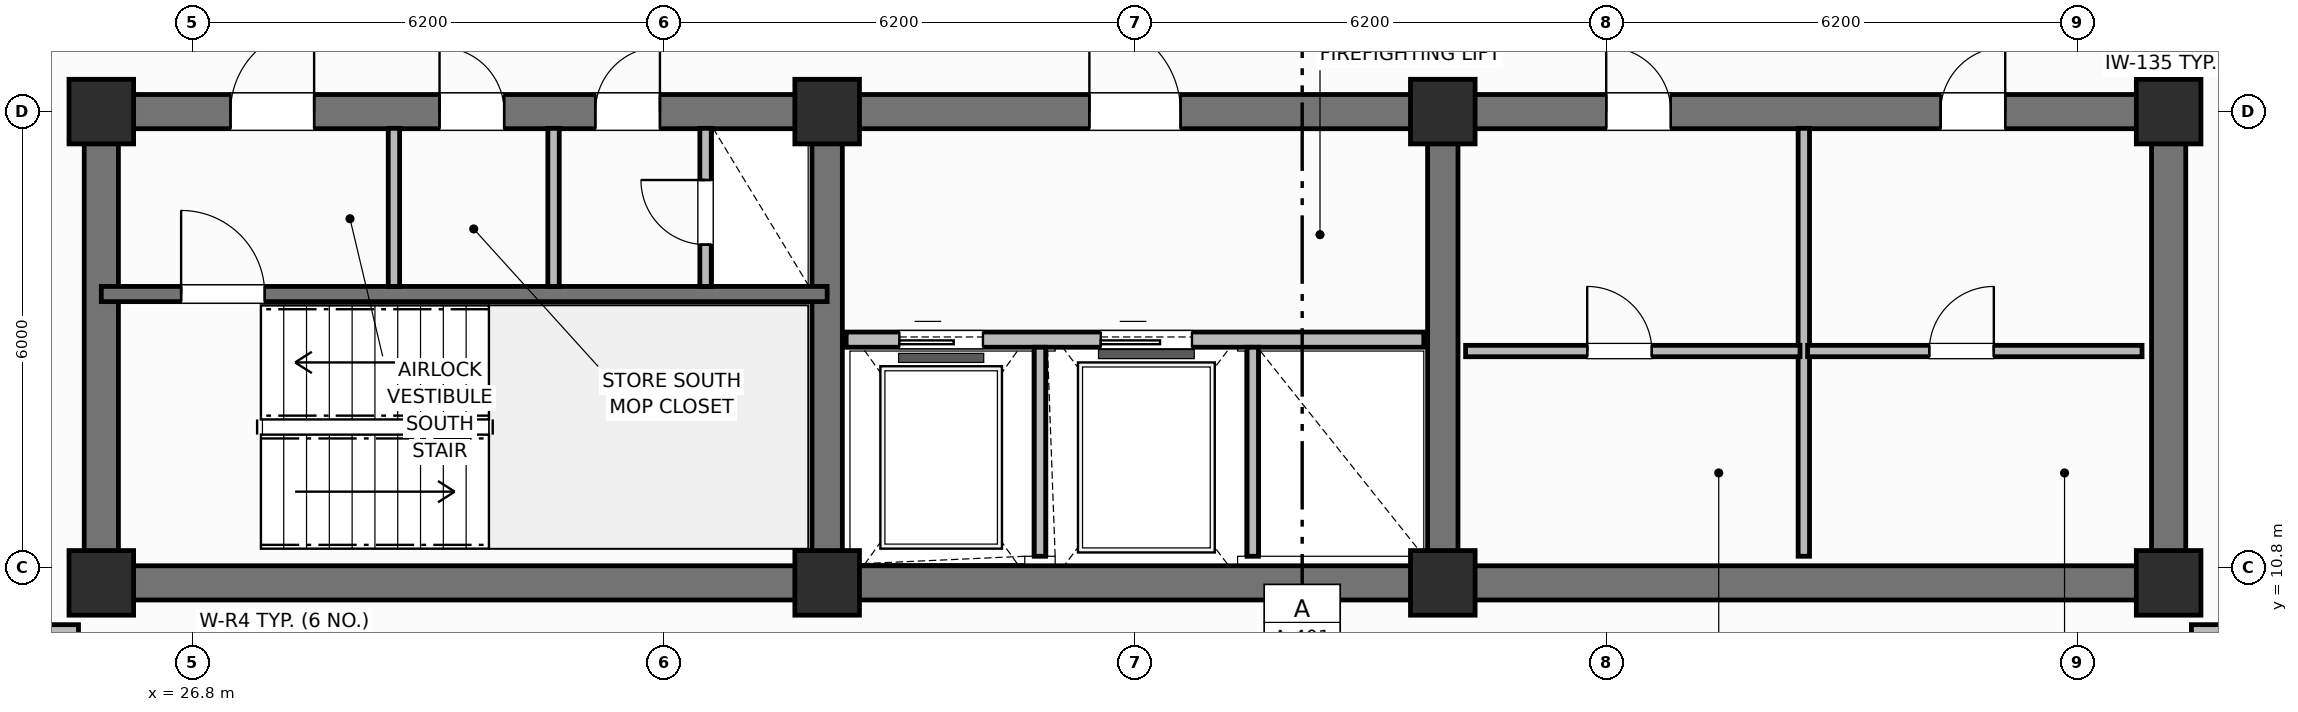
"""IFC4 building model, lengths in metres.
Left out: names, types, materials, properties, quantities, classifications, styles, units other than length and angle.
Written with IfcOpenShell. Run it as: python <this file> out.ifc"""

import sys

from ifc_helpers import new_model, si_unit, direction, frame, frame_2d, origin, origin_2d, place, context, subcontext, project, spatial, rectangle, extrude, element, fill, save


model = new_model("IFC4")
c1 = context("Model", 3, precision=1e-05, world=origin(), true_north=direction((0.0, 1.0)))
c2 = subcontext(c1, "Body", "Model", "MODEL_VIEW")
j1 = project(units=[si_unit("LENGTHUNIT", "METRE"), si_unit("PLANEANGLEUNIT", "RADIAN")], contexts=[c1])
p1 = place(None, origin())
s1 = spatial("IfcSite", under=j1, at=p1, CompositionType="ELEMENT")
p2 = place(p1, origin())
s2 = spatial("IfcBuilding", under=s1, at=p2, CompositionType="ELEMENT")
p3 = place(p2, frame((0.0, 0.0, 244.3)))
s3 = spatial("IfcBuildingStorey", under=s2, at=p3, CompositionType="ELEMENT", Elevation=244.3)
p4 = place(p3, frame((52.8, 10.6, 0.0), z_axis=(0.0, 0.0, 1.0), x_axis=(-1.0, 0.0, 0.0)))
e1 = element("IfcWall", 1, at=p4, inside=s3, PredefinedType="SHEAR", context=c2, shape_type="SweptSolid", body=[
    extrude(rectangle(XDim=27.2, YDim=0.45, at=frame_2d((13.6, 0.0))), origin(), (0.0, 0.0, 1.0), 3.7),
])
for number, where, z_axis, x_axis in (
    (2, (25.6, 10.825, 0.0), (0.0, 0.0, 1.0), (0.0, 1.0, 0.0)),
    (3, (52.8, 10.825, 0.0), (0.0, 0.0, 1.0), (0.0, 1.0, 0.0)),
):
    element("IfcWall", number, at=place(p3, frame(where, z_axis=z_axis, x_axis=x_axis)), inside=s3, PredefinedType="SHEAR", context=c2, shape_type="SweptSolid", body=[
        extrude(rectangle(XDim=5.75, YDim=0.45, at=frame_2d((2.875, 0.0))), origin(), (0.0, 0.0, 1.0), 3.7),
    ])
p5 = place(p3, frame((25.6, 16.8, 0.0), z_axis=(0.0, 0.0, 1.0), x_axis=(1.0, 0.0, 0.0)))
e4 = element("IfcWall", 4, at=p5, inside=s3, PredefinedType="SHEAR", context=c2, shape_type="SweptSolid", body=[
    extrude(rectangle(XDim=27.2, YDim=0.45, at=frame_2d((13.6, 0.0))), origin(), (0.0, 0.0, 1.0), 3.7),
])
p6 = place(p5, frame((1.7, 0.0, 0.0)))
e5 = element("IfcOpeningElement", 5, at=p6, cuts=e4, PredefinedType="OPENING", context=c2, shape_type="SweptSolid", body=[
    extrude(rectangle(XDim=1.1, YDim=2.15, at=frame_2d((0.55, 1.075))), frame((0.0, 0.235, 0.0), z_axis=(0.0, -1.0, 0.0), x_axis=(1.0, 0.0, 0.0)), (0.0, 0.0, 1.0), 0.47),
])
p7 = place(p5, frame((4.45, 0.0, 0.0)))
e6 = element("IfcOpeningElement", 6, at=p7, cuts=e4, PredefinedType="OPENING", context=c2, shape_type="SweptSolid", body=[
    extrude(rectangle(XDim=0.85, YDim=2.1, at=frame_2d((0.425, 1.05))), frame((0.0, 0.235, 0.0), z_axis=(0.0, -1.0, 0.0), x_axis=(1.0, 0.0, 0.0)), (0.0, 0.0, 1.0), 0.47),
])
p8 = place(p5, frame((6.5, 0.0, 0.0)))
e7 = element("IfcOpeningElement", 7, at=p8, cuts=e4, PredefinedType="OPENING", context=c2, shape_type="SweptSolid", body=[
    extrude(rectangle(XDim=0.85, YDim=2.1, at=frame_2d((0.425, 1.05))), frame((0.0, 0.235, 0.0), z_axis=(0.0, -1.0, 0.0), x_axis=(1.0, 0.0, 0.0)), (0.0, 0.0, 1.0), 0.47),
])
p9 = place(p5, frame((13.0, 0.0, 0.0)))
e8 = element("IfcOpeningElement", 8, at=p9, cuts=e4, PredefinedType="OPENING", context=c2, shape_type="SweptSolid", body=[
    extrude(rectangle(XDim=1.2, YDim=2.15, at=frame_2d((0.6, 1.075))), frame((0.0, 0.235, 0.0), z_axis=(0.0, -1.0, 0.0), x_axis=(1.0, 0.0, 0.0)), (0.0, 0.0, 1.0), 0.47),
])
p10 = place(p5, frame((19.8, 0.0, 0.0)))
e9 = element("IfcOpeningElement", 9, at=p10, cuts=e4, PredefinedType="OPENING", context=c2, shape_type="SweptSolid", body=[
    extrude(rectangle(XDim=0.85, YDim=2.1, at=frame_2d((0.425, 1.05))), frame((0.0, 0.235, 0.0), z_axis=(0.0, -1.0, 0.0), x_axis=(1.0, 0.0, 0.0)), (0.0, 0.0, 1.0), 0.47),
])
p11 = place(p5, frame((24.2, 0.0, 0.0)))
e10 = element("IfcOpeningElement", 10, at=p11, cuts=e4, PredefinedType="OPENING", context=c2, shape_type="SweptSolid", body=[
    extrude(rectangle(XDim=0.85, YDim=2.1, at=frame_2d((0.425, 1.05))), frame((0.0, 0.235, 0.0), z_axis=(0.0, -1.0, 0.0), x_axis=(1.0, 0.0, 0.0)), (0.0, 0.0, 1.0), 0.47),
])
for number, where, z_axis, x_axis in (
    (11, (35.15, 10.825, 0.0), (0.0, 0.0, 1.0), (0.0, 1.0, 0.0)),
    (12, (43.25, 10.825, 0.0), (0.0, 0.0, 1.0), (0.0, 1.0, 0.0)),
):
    element("IfcWall", number, at=place(p3, frame(where, z_axis=z_axis, x_axis=x_axis)), inside=s3, PredefinedType="SHEAR", context=c2, shape_type="SweptSolid", body=[
        extrude(rectangle(XDim=5.75, YDim=0.4, at=frame_2d((2.875, 0.0))), origin(), (0.0, 0.0, 1.0), 3.7),
    ])
for number, where, z_axis, x_axis in (
    (13, (25.6, 10.6, 0.0), (0.0, 0.0, 1.0), (1.0, 0.0, 0.0)),
    (14, (25.6, 16.8, 0.0), (0.0, 0.0, 1.0), (1.0, 0.0, 0.0)),
    (15, (35.15, 10.6, 0.0), (0.0, 0.0, 1.0), (1.0, 0.0, 0.0)),
    (16, (35.15, 16.8, 0.0), (0.0, 0.0, 1.0), (1.0, 0.0, 0.0)),
    (17, (43.25, 10.6, 0.0), (0.0, 0.0, 1.0), (1.0, 0.0, 0.0)),
    (18, (43.25, 16.8, 0.0), (0.0, 0.0, 1.0), (1.0, 0.0, 0.0)),
    (19, (52.8, 10.6, 0.0), (0.0, 0.0, 1.0), (1.0, 0.0, 0.0)),
    (20, (52.8, 16.8, 0.0), (0.0, 0.0, 1.0), (1.0, 0.0, 0.0)),
):
    element("IfcColumn", number, at=place(p3, frame(where, z_axis=z_axis, x_axis=x_axis)), inside=s3, PredefinedType="COLUMN", context=c2, shape_type="SweptSolid", body=[
        extrude(rectangle(XDim=0.85, YDim=0.85, at=origin_2d()), origin(), (0.0, 0.0, 1.0), 3.7),
    ])
p12 = place(p3, frame((25.6, 14.4, 0.0), z_axis=(0.0, 0.0, 1.0), x_axis=(1.0, 0.0, 0.0)))
e21 = element("IfcWall", 21, at=p12, inside=s3, PredefinedType="SHEAR", context=c2, shape_type="SweptSolid", body=[
    extrude(rectangle(XDim=9.55, YDim=0.2, at=frame_2d((4.775, 0.0))), origin(), (0.0, 0.0, 1.0), 3.7),
])
p13 = place(p12, frame((1.05, 0.0, 0.0)))
e22 = element("IfcOpeningElement", 22, at=p13, cuts=e21, PredefinedType="OPENING", context=c2, shape_type="SweptSolid", body=[
    extrude(rectangle(XDim=1.1, YDim=2.15, at=frame_2d((0.55, 1.075))), frame((0.0, 0.11, 0.0), z_axis=(0.0, -1.0, 0.0), x_axis=(1.0, 0.0, 0.0)), (0.0, 0.0, 1.0), 0.22),
])
for number, where, z_axis, x_axis in (
    (23, (29.45, 14.5, 0.0), (0.0, 0.0, 1.0), (0.0, 1.0, 0.0)),
    (24, (31.55, 14.5, 0.0), (0.0, 0.0, 1.0), (0.0, 1.0, 0.0)),
):
    element("IfcWall", number, at=place(p3, frame(where, z_axis=z_axis, x_axis=x_axis)), inside=s3, PredefinedType="PARTITIONING", context=c2, shape_type="SweptSolid", body=[
        extrude(rectangle(XDim=2.08, YDim=0.15, at=frame_2d((1.04, 0.0))), origin(), (0.0, 0.0, 1.0), 2.56),
    ])
p14 = place(p3, frame((33.55, 14.5, 0.0), z_axis=(0.0, 0.0, 1.0), x_axis=(0.0, 1.0, 0.0)))
e25 = element("IfcWall", 25, at=p14, inside=s3, PredefinedType="PARTITIONING", context=c2, shape_type="SweptSolid", body=[
    extrude(rectangle(XDim=2.08, YDim=0.15, at=frame_2d((1.04, 0.0))), origin(), (0.0, 0.0, 1.0), 2.56),
])
p15 = place(p14, frame((0.55, 0.0, 0.0)))
e26 = element("IfcOpeningElement", 26, at=p15, cuts=e25, PredefinedType="OPENING", context=c2, shape_type="SweptSolid", body=[
    extrude(rectangle(XDim=0.85, YDim=2.05, at=frame_2d((0.425, 1.025))), frame((0.0, 0.085, 0.0), z_axis=(0.0, -1.0, 0.0), x_axis=(1.0, 0.0, 0.0)), (0.0, 0.0, 1.0), 0.17),
])
p16 = place(p3, frame((35.4, 13.8, 0.0), z_axis=(0.0, 0.0, 1.0), x_axis=(1.0, 0.0, 0.0)))
e27 = element("IfcWall", 27, at=p16, inside=s3, PredefinedType="PARTITIONING", context=c2, shape_type="SweptSolid", body=[
    extrude(rectangle(XDim=7.6, YDim=0.2, at=frame_2d((3.8, 0.0))), origin(), (0.0, 0.0, 1.0), 2.33),
])
p17 = place(p16, frame((0.7, 0.0, 0.0)))
e28 = element("IfcOpeningElement", 28, at=p17, cuts=e27, PredefinedType="OPENING", context=c2, shape_type="SweptSolid", body=[
    extrude(rectangle(XDim=1.1, YDim=2.15, at=frame_2d((0.55, 1.075))), frame((0.0, 0.11, 0.0), z_axis=(0.0, -1.0, 0.0), x_axis=(1.0, 0.0, 0.0)), (0.0, 0.0, 1.0), 0.22),
])
p18 = place(p16, frame((3.35, 0.0, 0.0)))
e29 = element("IfcOpeningElement", 29, at=p18, cuts=e27, PredefinedType="OPENING", context=c2, shape_type="SweptSolid", body=[
    extrude(rectangle(XDim=1.2, YDim=2.15, at=frame_2d((0.6, 1.075))), frame((0.0, 0.11, 0.0), z_axis=(0.0, -1.0, 0.0), x_axis=(1.0, 0.0, 0.0)), (0.0, 0.0, 1.0), 0.22),
])
for number, where, z_axis, x_axis in (
    (30, (37.95, 10.95, 0.0), (0.0, 0.0, 1.0), (0.0, 1.0, 0.0)),
    (31, (40.75, 10.95, 0.0), (0.0, 0.0, 1.0), (0.0, 1.0, 0.0)),
):
    element("IfcWall", number, at=place(p3, frame(where, z_axis=z_axis, x_axis=x_axis)), inside=s3, PredefinedType="PARTITIONING", context=c2, shape_type="SweptSolid", body=[
        extrude(rectangle(XDim=2.75, YDim=0.15, at=frame_2d((1.375, 0.0))), origin(), (0.0, 0.0, 1.0), 2.56),
    ])
p19 = place(p3, frame((48.0, 10.95, 0.0), z_axis=(0.0, 0.0, 1.0), x_axis=(0.0, 1.0, 0.0)))
e32 = element("IfcWall", 32, at=p19, inside=s3, PredefinedType="PARTITIONING", context=c2, shape_type="SweptSolid", body=[
    extrude(rectangle(XDim=5.63, YDim=0.15, at=frame_2d((2.815, 0.0))), origin(), (0.0, 0.0, 1.0), 2.56),
])
p20 = place(p3, frame((43.55, 13.65, 0.0), z_axis=(0.0, 0.0, 1.0), x_axis=(1.0, 0.0, 0.0)))
e33 = element("IfcWall", 33, at=p20, inside=s3, PredefinedType="PARTITIONING", context=c2, shape_type="SweptSolid", body=[
    extrude(rectangle(XDim=4.4, YDim=0.15, at=frame_2d((2.2, 0.0))), origin(), (0.0, 0.0, 1.0), 2.56),
])
p21 = place(p20, frame((1.6, 0.0, 0.0)))
e34 = element("IfcOpeningElement", 34, at=p21, cuts=e33, PredefinedType="OPENING", context=c2, shape_type="SweptSolid", body=[
    extrude(rectangle(XDim=0.85, YDim=2.1, at=frame_2d((0.425, 1.05))), frame((0.0, 0.085, 0.0), z_axis=(0.0, -1.0, 0.0), x_axis=(1.0, 0.0, 0.0)), (0.0, 0.0, 1.0), 0.17),
])
p22 = place(p3, frame((48.05, 13.65, 0.0), z_axis=(0.0, 0.0, 1.0), x_axis=(1.0, 0.0, 0.0)))
e35 = element("IfcWall", 35, at=p22, inside=s3, PredefinedType="PARTITIONING", context=c2, shape_type="SweptSolid", body=[
    extrude(rectangle(XDim=4.4, YDim=0.15, at=frame_2d((2.2, 0.0))), origin(), (0.0, 0.0, 1.0), 2.56),
])
p23 = place(p22, frame((1.6, 0.0, 0.0)))
e36 = element("IfcOpeningElement", 36, at=p23, cuts=e35, PredefinedType="OPENING", context=c2, shape_type="SweptSolid", body=[
    extrude(rectangle(XDim=0.85, YDim=2.1, at=frame_2d((0.425, 1.05))), frame((0.0, 0.085, 0.0), z_axis=(0.0, -1.0, 0.0), x_axis=(1.0, 0.0, 0.0)), (0.0, 0.0, 1.0), 0.17),
])
p24 = place(p3, frame((21.546, 9.95, 0.0), z_axis=(0.0, 0.0, 1.0), x_axis=(1.0, 0.0, 0.0)))
e37 = element("IfcWall", 37, at=p24, inside=s3, PredefinedType="PARTITIONING", context=c2, shape_type="SweptSolid", body=[
    extrude(rectangle(XDim=3.754, YDim=0.2, at=frame_2d((1.877, 0.0))), origin(), (0.0, 0.0, 1.0), 2.56),
])
p25 = place(p3, frame((53.1, 9.95, 0.0), z_axis=(0.0, 0.0, 1.0), x_axis=(1.0, 0.0, 0.0)))
e38 = element("IfcWall", 38, at=p25, inside=s3, PredefinedType="PARTITIONING", context=c2, shape_type="SweptSolid", body=[
    extrude(rectangle(XDim=3.754, YDim=0.2, at=frame_2d((1.877, 0.0))), origin(), (0.0, 0.0, 1.0), 2.56),
])
p26 = place(p13, origin())
e39 = element("IfcDoor", 39, at=p26, inside=s3, OperationType="SINGLE_SWING_LEFT", PredefinedType="DOOR", context=c2, shape_type="SweptSolid", body=[
    extrude(rectangle(XDim=1.1, YDim=2.15, at=frame_2d((0.55, 1.075))), frame((0.0, 0.025, 0.0), z_axis=(0.0, -1.0, 0.0), x_axis=(1.0, 0.0, 0.0)), (0.0, 0.0, 1.0), 0.05),
])
fill(e22, e39)
p27 = place(p15, origin())
e40 = element("IfcDoor", 40, at=p27, inside=s3, OperationType="SINGLE_SWING_RIGHT", PredefinedType="TRAPDOOR", context=c2, shape_type="SweptSolid", body=[
    extrude(rectangle(XDim=0.85, YDim=2.05, at=frame_2d((0.425, 1.025))), frame((0.0, 0.025, 0.0), z_axis=(0.0, -1.0, 0.0), x_axis=(1.0, 0.0, 0.0)), (0.0, 0.0, 1.0), 0.05),
])
fill(e26, e40)
p28 = place(p17, origin())
e41 = element("IfcDoor", 41, at=p28, inside=s3, OperationType="SLIDING_TO_LEFT", PredefinedType="DOOR", context=c2, shape_type="SweptSolid", body=[
    extrude(rectangle(XDim=1.1, YDim=2.15, at=frame_2d((0.55, 1.075))), frame((0.0, 0.025, 0.0), z_axis=(0.0, -1.0, 0.0), x_axis=(1.0, 0.0, 0.0)), (0.0, 0.0, 1.0), 0.05),
])
fill(e28, e41)
p29 = place(p18, origin())
e42 = element("IfcDoor", 42, at=p29, inside=s3, OperationType="SLIDING_TO_LEFT", PredefinedType="DOOR", context=c2, shape_type="SweptSolid", body=[
    extrude(rectangle(XDim=1.2, YDim=2.15, at=frame_2d((0.6, 1.075))), frame((0.0, 0.025, 0.0), z_axis=(0.0, -1.0, 0.0), x_axis=(1.0, 0.0, 0.0)), (0.0, 0.0, 1.0), 0.05),
])
fill(e29, e42)
p30 = place(p21, origin())
e43 = element("IfcDoor", 43, at=p30, inside=s3, OperationType="SINGLE_SWING_LEFT", PredefinedType="DOOR", context=c2, shape_type="SweptSolid", body=[
    extrude(rectangle(XDim=0.85, YDim=2.1, at=frame_2d((0.425, 1.05))), frame((0.0, 0.025, 0.0), z_axis=(0.0, -1.0, 0.0), x_axis=(1.0, 0.0, 0.0)), (0.0, 0.0, 1.0), 0.05),
])
fill(e34, e43)
p31 = place(p23, origin())
e44 = element("IfcDoor", 44, at=p31, inside=s3, OperationType="SINGLE_SWING_RIGHT", PredefinedType="DOOR", context=c2, shape_type="SweptSolid", body=[
    extrude(rectangle(XDim=0.85, YDim=2.1, at=frame_2d((0.425, 1.05))), frame((0.0, 0.025, 0.0), z_axis=(0.0, -1.0, 0.0), x_axis=(1.0, 0.0, 0.0)), (0.0, 0.0, 1.0), 0.05),
])
fill(e36, e44)
p32 = place(p6, origin())
e45 = element("IfcDoor", 45, at=p32, inside=s3, OperationType="SINGLE_SWING_RIGHT", PredefinedType="DOOR", context=c2, shape_type="SweptSolid", body=[
    extrude(rectangle(XDim=1.1, YDim=2.15, at=frame_2d((0.55, 1.075))), frame((0.0, 0.025, 0.0), z_axis=(0.0, -1.0, 0.0), x_axis=(1.0, 0.0, 0.0)), (0.0, 0.0, 1.0), 0.05),
])
fill(e5, e45)
p33 = place(p7, origin())
e46 = element("IfcDoor", 46, at=p33, inside=s3, OperationType="SINGLE_SWING_LEFT", PredefinedType="DOOR", context=c2, shape_type="SweptSolid", body=[
    extrude(rectangle(XDim=0.85, YDim=2.1, at=frame_2d((0.425, 1.05))), frame((0.0, 0.025, 0.0), z_axis=(0.0, -1.0, 0.0), x_axis=(1.0, 0.0, 0.0)), (0.0, 0.0, 1.0), 0.05),
])
fill(e6, e46)
p34 = place(p8, origin())
e47 = element("IfcDoor", 47, at=p34, inside=s3, OperationType="SINGLE_SWING_RIGHT", PredefinedType="DOOR", context=c2, shape_type="SweptSolid", body=[
    extrude(rectangle(XDim=0.85, YDim=2.1, at=frame_2d((0.425, 1.05))), frame((0.0, 0.025, 0.0), z_axis=(0.0, -1.0, 0.0), x_axis=(1.0, 0.0, 0.0)), (0.0, 0.0, 1.0), 0.05),
])
fill(e7, e47)
p35 = place(p9, origin())
e48 = element("IfcDoor", 48, at=p35, inside=s3, OperationType="SINGLE_SWING_LEFT", PredefinedType="DOOR", context=c2, shape_type="SweptSolid", body=[
    extrude(rectangle(XDim=1.2, YDim=2.15, at=frame_2d((0.6, 1.075))), frame((0.0, 0.025, 0.0), z_axis=(0.0, -1.0, 0.0), x_axis=(1.0, 0.0, 0.0)), (0.0, 0.0, 1.0), 0.05),
])
fill(e8, e48)
p36 = place(p10, origin())
e49 = element("IfcDoor", 49, at=p36, inside=s3, OperationType="SINGLE_SWING_LEFT", PredefinedType="DOOR", context=c2, shape_type="SweptSolid", body=[
    extrude(rectangle(XDim=0.85, YDim=2.1, at=frame_2d((0.425, 1.05))), frame((0.0, 0.025, 0.0), z_axis=(0.0, -1.0, 0.0), x_axis=(1.0, 0.0, 0.0)), (0.0, 0.0, 1.0), 0.05),
])
fill(e9, e49)
p37 = place(p11, origin())
e50 = element("IfcDoor", 50, at=p37, inside=s3, OperationType="SINGLE_SWING_RIGHT", PredefinedType="DOOR", context=c2, shape_type="SweptSolid", body=[
    extrude(rectangle(XDim=0.85, YDim=2.1, at=frame_2d((0.425, 1.05))), frame((0.0, 0.025, 0.0), z_axis=(0.0, -1.0, 0.0), x_axis=(1.0, 0.0, 0.0)), (0.0, 0.0, 1.0), 0.05),
])
fill(e10, e50)
save(model, sys.argv[1])
